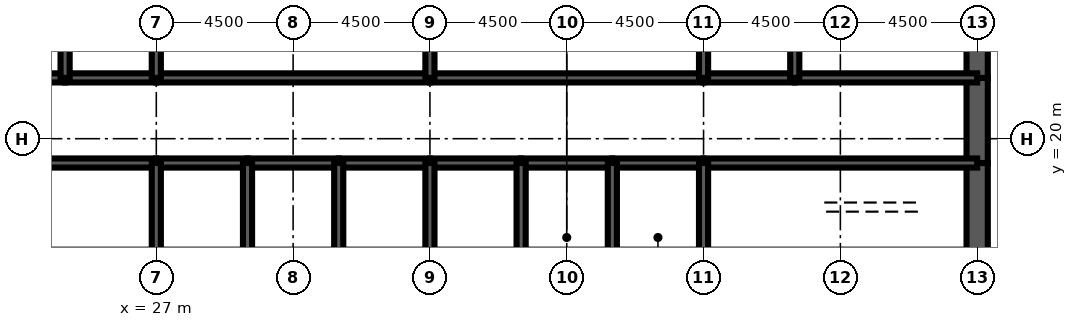
"""IFC4 building model, lengths in metres.
Left out: names, types, materials, properties, quantities, classifications, styles, units other than length and angle.
Written with IfcOpenShell. Run it as: python <this file> out.ifc"""

import sys

from ifc_helpers import new_model, si_unit, direction, frame, frame_2d, origin, place, context, subcontext, project, spatial, rectangle, extrude, element, fill, save


model = new_model("IFC4")
c1 = context("Model", 3, precision=1e-05, world=origin(), true_north=direction((0.0, 1.0)))
c2 = subcontext(c1, "Body", "Model", "MODEL_VIEW")
j1 = project(units=[si_unit("LENGTHUNIT", "METRE"), si_unit("PLANEANGLEUNIT", "RADIAN")], contexts=[c1])
p1 = place(None, origin())
s1 = spatial("IfcSite", under=j1, at=p1, CompositionType="ELEMENT")
p2 = place(p1, origin())
s2 = spatial("IfcBuilding", under=s1, at=p2, CompositionType="ELEMENT")
p3 = place(p2, frame((0.0, 0.0, 287.9)))
s3 = spatial("IfcBuildingStorey", under=s2, at=p3, CompositionType="ELEMENT", Elevation=287.9)
p4 = place(p3, frame((54.0, 16.0, 0.0), z_axis=(0.0, 0.0, 1.0), x_axis=(0.0, 1.0, 0.0)))
e1 = element("IfcWall", 1, at=p4, inside=s3, PredefinedType="SHEAR", context=c2, shape_type="SweptSolid", body=[
    extrude(rectangle(XDim=3.2, YDim=0.7, at=frame_2d((1.6, 0.0))), origin(), (0.0, 0.0, 1.0), 4.2),
])
p5 = place(p3, frame((54.0, 19.2, 0.0), z_axis=(0.0, 0.0, 1.0), x_axis=(0.0, 1.0, 0.0)))
e2 = element("IfcWall", 2, at=p5, inside=s3, PredefinedType="SHEAR", context=c2, shape_type="SweptSolid", body=[
    extrude(rectangle(XDim=2.8, YDim=0.7, at=frame_2d((1.4, 0.0))), origin(), (0.0, 0.0, 1.0), 4.2),
])
p6 = place(p5, frame((0.4, 0.0, 0.0)))
e3 = element("IfcOpeningElement", 3, at=p6, cuts=e2, PredefinedType="OPENING", context=c2, shape_type="SweptSolid", body=[
    extrude(rectangle(XDim=1.8, YDim=2.1, at=frame_2d((0.9, 1.05))), frame((0.0, 0.36, 0.0), z_axis=(0.0, -1.0, 0.0), x_axis=(1.0, 0.0, 0.0)), (0.0, 0.0, 1.0), 0.72),
])
p7 = place(p3, frame((54.0, 22.0, 0.0), z_axis=(0.0, 0.0, 1.0), x_axis=(0.0, 1.0, 0.0)))
e4 = element("IfcWall", 4, at=p7, inside=s3, PredefinedType="SHEAR", context=c2, shape_type="SweptSolid", body=[
    extrude(rectangle(XDim=4.0, YDim=0.7, at=frame_2d((2.0, 0.0))), origin(), (0.0, 0.0, 1.0), 4.2),
])
p8 = place(p3, frame((18.0, 19.2, 0.0), z_axis=(0.0, 0.0, 1.0), x_axis=(1.0, 0.0, 0.0)))
e5 = element("IfcWall", 5, at=p8, inside=s3, PredefinedType="SOLIDWALL", context=c2, shape_type="SweptSolid", body=[
    extrude(rectangle(XDim=9.0, YDim=0.3, at=frame_2d((4.5, 0.0))), origin(), (0.0, 0.0, 1.0), 4.2),
])
p9 = place(p8, frame((0.65, 0.0, 0.0)))
e6 = element("IfcOpeningElement", 6, at=p9, cuts=e5, PredefinedType="OPENING", context=c2, shape_type="SweptSolid", body=[
    extrude(rectangle(XDim=1.0, YDim=2.1, at=frame_2d((0.5, 1.05))), frame((0.0, 0.16, 0.0), z_axis=(0.0, -1.0, 0.0), x_axis=(1.0, 0.0, 0.0)), (0.0, 0.0, 1.0), 0.32),
])
p10 = place(p3, frame((27.0, 19.2, 0.0), z_axis=(0.0, 0.0, 1.0), x_axis=(1.0, 0.0, 0.0)))
e7 = element("IfcWall", 7, at=p10, inside=s3, PredefinedType="SOLIDWALL", context=c2, shape_type="SweptSolid", body=[
    extrude(rectangle(XDim=3.0, YDim=0.3, at=frame_2d((1.5, 0.0))), origin(), (0.0, 0.0, 1.0), 4.2),
])
p11 = place(p10, frame((0.95, 0.0, 0.0)))
e8 = element("IfcOpeningElement", 8, at=p11, cuts=e7, PredefinedType="OPENING", context=c2, shape_type="SweptSolid", body=[
    extrude(rectangle(XDim=1.1, YDim=2.2, at=frame_2d((0.55, 1.1))), frame((0.0, 0.16, 0.0), z_axis=(0.0, -1.0, 0.0), x_axis=(1.0, 0.0, 0.0)), (0.0, 0.0, 1.0), 0.32),
])
p12 = place(p3, frame((30.0, 19.2, 0.0), z_axis=(0.0, 0.0, 1.0), x_axis=(1.0, 0.0, 0.0)))
e9 = element("IfcWall", 9, at=p12, inside=s3, PredefinedType="SOLIDWALL", context=c2, shape_type="SweptSolid", body=[
    extrude(rectangle(XDim=3.0, YDim=0.3, at=frame_2d((1.5, 0.0))), origin(), (0.0, 0.0, 1.0), 4.2),
])
p13 = place(p12, frame((0.95, 0.0, 0.0)))
e10 = element("IfcOpeningElement", 10, at=p13, cuts=e9, PredefinedType="OPENING", context=c2, shape_type="SweptSolid", body=[
    extrude(rectangle(XDim=1.1, YDim=2.2, at=frame_2d((0.55, 1.1))), frame((0.0, 0.16, 0.0), z_axis=(0.0, -1.0, 0.0), x_axis=(1.0, 0.0, 0.0)), (0.0, 0.0, 1.0), 0.32),
])
p14 = place(p3, frame((33.0, 19.2, 0.0), z_axis=(0.0, 0.0, 1.0), x_axis=(1.0, 0.0, 0.0)))
e11 = element("IfcWall", 11, at=p14, inside=s3, PredefinedType="SOLIDWALL", context=c2, shape_type="SweptSolid", body=[
    extrude(rectangle(XDim=3.0, YDim=0.3, at=frame_2d((1.5, 0.0))), origin(), (0.0, 0.0, 1.0), 4.2),
])
p15 = place(p14, frame((0.95, 0.0, 0.0)))
e12 = element("IfcOpeningElement", 12, at=p15, cuts=e11, PredefinedType="OPENING", context=c2, shape_type="SweptSolid", body=[
    extrude(rectangle(XDim=1.1, YDim=2.2, at=frame_2d((0.55, 1.1))), frame((0.0, 0.16, 0.0), z_axis=(0.0, -1.0, 0.0), x_axis=(1.0, 0.0, 0.0)), (0.0, 0.0, 1.0), 0.32),
])
p16 = place(p3, frame((36.0, 19.2, 0.0), z_axis=(0.0, 0.0, 1.0), x_axis=(1.0, 0.0, 0.0)))
e13 = element("IfcWall", 13, at=p16, inside=s3, PredefinedType="SOLIDWALL", context=c2, shape_type="SweptSolid", body=[
    extrude(rectangle(XDim=3.0, YDim=0.3, at=frame_2d((1.5, 0.0))), origin(), (0.0, 0.0, 1.0), 4.2),
])
p17 = place(p16, frame((0.95, 0.0, 0.0)))
e14 = element("IfcOpeningElement", 14, at=p17, cuts=e13, PredefinedType="OPENING", context=c2, shape_type="SweptSolid", body=[
    extrude(rectangle(XDim=1.1, YDim=2.2, at=frame_2d((0.55, 1.1))), frame((0.0, 0.16, 0.0), z_axis=(0.0, -1.0, 0.0), x_axis=(1.0, 0.0, 0.0)), (0.0, 0.0, 1.0), 0.32),
])
p18 = place(p3, frame((39.0, 19.2, 0.0), z_axis=(0.0, 0.0, 1.0), x_axis=(1.0, 0.0, 0.0)))
e15 = element("IfcWall", 15, at=p18, inside=s3, PredefinedType="SOLIDWALL", context=c2, shape_type="SweptSolid", body=[
    extrude(rectangle(XDim=3.0, YDim=0.3, at=frame_2d((1.5, 0.0))), origin(), (0.0, 0.0, 1.0), 4.2),
])
p19 = place(p18, frame((1.0, 0.0, 0.0)))
e16 = element("IfcOpeningElement", 16, at=p19, cuts=e15, PredefinedType="OPENING", context=c2, shape_type="SweptSolid", body=[
    extrude(rectangle(XDim=1.0, YDim=2.1, at=frame_2d((0.5, 1.05))), frame((0.0, 0.16, 0.0), z_axis=(0.0, -1.0, 0.0), x_axis=(1.0, 0.0, 0.0)), (0.0, 0.0, 1.0), 0.32),
])
p20 = place(p3, frame((42.0, 19.2, 0.0), z_axis=(0.0, 0.0, 1.0), x_axis=(1.0, 0.0, 0.0)))
e17 = element("IfcWall", 17, at=p20, inside=s3, PredefinedType="SOLIDWALL", context=c2, shape_type="SweptSolid", body=[
    extrude(rectangle(XDim=3.0, YDim=0.3, at=frame_2d((1.5, 0.0))), origin(), (0.0, 0.0, 1.0), 4.2),
])
p21 = place(p20, frame((1.0, 0.0, 0.0)))
e18 = element("IfcOpeningElement", 18, at=p21, cuts=e17, PredefinedType="OPENING", context=c2, shape_type="SweptSolid", body=[
    extrude(rectangle(XDim=1.0, YDim=2.1, at=frame_2d((0.5, 1.05))), frame((0.0, 0.16, 0.0), z_axis=(0.0, -1.0, 0.0), x_axis=(1.0, 0.0, 0.0)), (0.0, 0.0, 1.0), 0.32),
])
p22 = place(p3, frame((45.0, 19.2, 0.0), z_axis=(0.0, 0.0, 1.0), x_axis=(1.0, 0.0, 0.0)))
e19 = element("IfcWall", 19, at=p22, inside=s3, PredefinedType="SOLIDWALL", context=c2, shape_type="SweptSolid", body=[
    extrude(rectangle(XDim=9.0, YDim=0.3, at=frame_2d((4.5, 0.0))), origin(), (0.0, 0.0, 1.0), 4.2),
])
p23 = place(p22, frame((7.35, 0.0, 0.0)))
e20 = element("IfcOpeningElement", 20, at=p23, cuts=e19, PredefinedType="OPENING", context=c2, shape_type="SweptSolid", body=[
    extrude(rectangle(XDim=1.0, YDim=2.1, at=frame_2d((0.5, 1.05))), frame((0.0, 0.16, 0.0), z_axis=(0.0, -1.0, 0.0), x_axis=(1.0, 0.0, 0.0)), (0.0, 0.0, 1.0), 0.32),
])
p24 = place(p3, frame((18.0, 22.0, 0.0), z_axis=(0.0, 0.0, 1.0), x_axis=(1.0, 0.0, 0.0)))
e21 = element("IfcWall", 21, at=p24, inside=s3, PredefinedType="SOLIDWALL", context=c2, shape_type="SweptSolid", body=[
    extrude(rectangle(XDim=6.0, YDim=0.3, at=frame_2d((3.0, 0.0))), origin(), (0.0, 0.0, 1.0), 4.2),
])
p25 = place(p24, frame((4.4, 0.0, 0.0)))
e22 = element("IfcOpeningElement", 22, at=p25, cuts=e21, PredefinedType="OPENING", context=c2, shape_type="SweptSolid", body=[
    extrude(rectangle(XDim=1.0, YDim=2.1, at=frame_2d((0.5, 1.05))), frame((0.0, 0.16, 0.0), z_axis=(0.0, -1.0, 0.0), x_axis=(1.0, 0.0, 0.0)), (0.0, 0.0, 1.0), 0.32),
])
p26 = place(p24, frame((0.75, 0.0, 0.0)))
e23 = element("IfcOpeningElement", 23, at=p26, cuts=e21, PredefinedType="OPENING", context=c2, shape_type="SweptSolid", body=[
    extrude(rectangle(XDim=1.0, YDim=2.1, at=frame_2d((0.5, 1.05))), frame((0.0, 0.16, 0.0), z_axis=(0.0, -1.0, 0.0), x_axis=(1.0, 0.0, 0.0)), (0.0, 0.0, 1.0), 0.32),
])
p27 = place(p3, frame((24.0, 22.0, 0.0), z_axis=(0.0, 0.0, 1.0), x_axis=(1.0, 0.0, 0.0)))
e24 = element("IfcWall", 24, at=p27, inside=s3, PredefinedType="SOLIDWALL", context=c2, shape_type="SweptSolid", body=[
    extrude(rectangle(XDim=3.0, YDim=0.3, at=frame_2d((1.5, 0.0))), origin(), (0.0, 0.0, 1.0), 4.2),
])
p28 = place(p27, frame((1.0, 0.0, 0.0)))
e25 = element("IfcOpeningElement", 25, at=p28, cuts=e24, PredefinedType="OPENING", context=c2, shape_type="SweptSolid", body=[
    extrude(rectangle(XDim=1.0, YDim=2.1, at=frame_2d((0.5, 1.05))), frame((0.0, 0.16, 0.0), z_axis=(0.0, -1.0, 0.0), x_axis=(1.0, 0.0, 0.0)), (0.0, 0.0, 1.0), 0.32),
])
p29 = place(p3, frame((27.0, 22.0, 0.0), z_axis=(0.0, 0.0, 1.0), x_axis=(1.0, 0.0, 0.0)))
e26 = element("IfcWall", 26, at=p29, inside=s3, PredefinedType="SOLIDWALL", context=c2, shape_type="SweptSolid", body=[
    extrude(rectangle(XDim=9.0, YDim=0.3, at=frame_2d((4.5, 0.0))), origin(), (0.0, 0.0, 1.0), 4.2),
])
p30 = place(p29, frame((4.0, 0.0, 0.0)))
e27 = element("IfcOpeningElement", 27, at=p30, cuts=e26, PredefinedType="OPENING", context=c2, shape_type="SweptSolid", body=[
    extrude(rectangle(XDim=1.0, YDim=2.1, at=frame_2d((0.5, 1.05))), frame((0.0, 0.16, 0.0), z_axis=(0.0, -1.0, 0.0), x_axis=(1.0, 0.0, 0.0)), (0.0, 0.0, 1.0), 0.32),
])
p31 = place(p3, frame((36.0, 22.0, 0.0), z_axis=(0.0, 0.0, 1.0), x_axis=(1.0, 0.0, 0.0)))
e28 = element("IfcWall", 28, at=p31, inside=s3, PredefinedType="SOLIDWALL", context=c2, shape_type="SweptSolid", body=[
    extrude(rectangle(XDim=9.0, YDim=0.3, at=frame_2d((4.5, 0.0))), origin(), (0.0, 0.0, 1.0), 4.2),
])
p32 = place(p31, frame((4.0, 0.0, 0.0)))
e29 = element("IfcOpeningElement", 29, at=p32, cuts=e28, PredefinedType="OPENING", context=c2, shape_type="SweptSolid", body=[
    extrude(rectangle(XDim=1.0, YDim=2.1, at=frame_2d((0.5, 1.05))), frame((0.0, 0.16, 0.0), z_axis=(0.0, -1.0, 0.0), x_axis=(1.0, 0.0, 0.0)), (0.0, 0.0, 1.0), 0.32),
])
p33 = place(p3, frame((45.0, 22.0, 0.0), z_axis=(0.0, 0.0, 1.0), x_axis=(1.0, 0.0, 0.0)))
e30 = element("IfcWall", 30, at=p33, inside=s3, PredefinedType="SOLIDWALL", context=c2, shape_type="SweptSolid", body=[
    extrude(rectangle(XDim=3.0, YDim=0.3, at=frame_2d((1.5, 0.0))), origin(), (0.0, 0.0, 1.0), 4.2),
])
p34 = place(p33, frame((1.0, 0.0, 0.0)))
e31 = element("IfcOpeningElement", 31, at=p34, cuts=e30, PredefinedType="OPENING", context=c2, shape_type="SweptSolid", body=[
    extrude(rectangle(XDim=1.0, YDim=2.1, at=frame_2d((0.5, 1.05))), frame((0.0, 0.16, 0.0), z_axis=(0.0, -1.0, 0.0), x_axis=(1.0, 0.0, 0.0)), (0.0, 0.0, 1.0), 0.32),
])
p35 = place(p3, frame((48.0, 22.0, 0.0), z_axis=(0.0, 0.0, 1.0), x_axis=(1.0, 0.0, 0.0)))
e32 = element("IfcWall", 32, at=p35, inside=s3, PredefinedType="SOLIDWALL", context=c2, shape_type="SweptSolid", body=[
    extrude(rectangle(XDim=6.0, YDim=0.3, at=frame_2d((3.0, 0.0))), origin(), (0.0, 0.0, 1.0), 4.2),
])
p36 = place(p35, frame((2.0, 0.0, 0.0)))
e33 = element("IfcOpeningElement", 33, at=p36, cuts=e32, PredefinedType="OPENING", context=c2, shape_type="SweptSolid", body=[
    extrude(rectangle(XDim=1.0, YDim=2.1, at=frame_2d((0.5, 1.05))), frame((0.0, 0.16, 0.0), z_axis=(0.0, -1.0, 0.0), x_axis=(1.0, 0.0, 0.0)), (0.0, 0.0, 1.0), 0.32),
])
for number, where, z_axis, x_axis in (
    (34, (27.0, 16.0, 0.0), (0.0, 0.0, 1.0), (0.0, 1.0, 0.0)),
    (35, (30.0, 16.0, 0.0), (0.0, 0.0, 1.0), (0.0, 1.0, 0.0)),
    (36, (33.0, 16.0, 0.0), (0.0, 0.0, 1.0), (0.0, 1.0, 0.0)),
    (37, (36.0, 16.0, 0.0), (0.0, 0.0, 1.0), (0.0, 1.0, 0.0)),
    (38, (39.0, 16.0, 0.0), (0.0, 0.0, 1.0), (0.0, 1.0, 0.0)),
    (39, (42.0, 16.0, 0.0), (0.0, 0.0, 1.0), (0.0, 1.0, 0.0)),
    (40, (45.0, 16.0, 0.0), (0.0, 0.0, 1.0), (0.0, 1.0, 0.0)),
):
    element("IfcWall", number, at=place(p3, frame(where, z_axis=z_axis, x_axis=x_axis)), inside=s3, PredefinedType="SOLIDWALL", context=c2, shape_type="SweptSolid", body=[
        extrude(rectangle(XDim=3.2, YDim=0.3, at=frame_2d((1.6, 0.0))), origin(), (0.0, 0.0, 1.0), 4.2),
    ])
for number, where, z_axis, x_axis in (
    (41, (24.0, 22.0, 0.0), (0.0, 0.0, 1.0), (0.0, 1.0, 0.0)),
    (42, (27.0, 22.0, 0.0), (0.0, 0.0, 1.0), (0.0, 1.0, 0.0)),
    (43, (36.0, 22.0, 0.0), (0.0, 0.0, 1.0), (0.0, 1.0, 0.0)),
    (44, (45.0, 22.0, 0.0), (0.0, 0.0, 1.0), (0.0, 1.0, 0.0)),
    (45, (48.0, 22.0, 0.0), (0.0, 0.0, 1.0), (0.0, 1.0, 0.0)),
):
    element("IfcWall", number, at=place(p3, frame(where, z_axis=z_axis, x_axis=x_axis)), inside=s3, PredefinedType="SOLIDWALL", context=c2, shape_type="SweptSolid", body=[
        extrude(rectangle(XDim=4.0, YDim=0.3, at=frame_2d((2.0, 0.0))), origin(), (0.0, 0.0, 1.0), 4.2),
    ])
p37 = place(p3, frame((39.15, 17.3, 0.0), z_axis=(0.0, 0.0, 1.0), x_axis=(1.0, 0.0, 0.0)))
e46 = element("IfcWall", 46, at=p37, inside=s3, PredefinedType="SOLIDWALL", context=c2, shape_type="SweptSolid", body=[
    extrude(rectangle(XDim=2.7, YDim=0.3, at=frame_2d((1.35, 0.0))), origin(), (0.0, 0.0, 1.0), 4.04),
])
p38 = place(p37, frame((0.85, 0.0, 0.0)))
e47 = element("IfcOpeningElement", 47, at=p38, cuts=e46, PredefinedType="OPENING", context=c2, shape_type="SweptSolid", body=[
    extrude(rectangle(XDim=1.0, YDim=2.1, at=frame_2d((0.5, 1.05))), frame((0.0, 0.16, 0.0), z_axis=(0.0, -1.0, 0.0), x_axis=(1.0, 0.0, 0.0)), (0.0, 0.0, 1.0), 0.32),
])
p39 = place(p3, frame((42.15, 17.3, 0.0), z_axis=(0.0, 0.0, 1.0), x_axis=(1.0, 0.0, 0.0)))
e48 = element("IfcWall", 48, at=p39, inside=s3, PredefinedType="SOLIDWALL", context=c2, shape_type="SweptSolid", body=[
    extrude(rectangle(XDim=2.7, YDim=0.3, at=frame_2d((1.35, 0.0))), origin(), (0.0, 0.0, 1.0), 4.04),
])
p40 = place(p39, frame((0.85, 0.0, 0.0)))
e49 = element("IfcOpeningElement", 49, at=p40, cuts=e48, PredefinedType="OPENING", context=c2, shape_type="SweptSolid", body=[
    extrude(rectangle(XDim=1.0, YDim=2.1, at=frame_2d((0.5, 1.05))), frame((0.0, 0.16, 0.0), z_axis=(0.0, -1.0, 0.0), x_axis=(1.0, 0.0, 0.0)), (0.0, 0.0, 1.0), 0.32),
])
p41 = place(p3, frame((24.5, 19.35, 0.0), z_axis=(0.0, 0.0, 1.0), x_axis=(0.0, 1.0, 0.0)))
e50 = element("IfcWall", 50, at=p41, inside=s3, PredefinedType="PARTITIONING", context=c2, shape_type="SweptSolid", body=[
    extrude(rectangle(XDim=2.5, YDim=0.15, at=frame_2d((1.25, 0.0))), origin(), (0.0, 0.0, 1.0), 3.0),
])
p42 = place(p41, frame((1.15, 0.0, 0.0)))
e51 = element("IfcOpeningElement", 51, at=p42, cuts=e50, PredefinedType="OPENING", context=c2, shape_type="SweptSolid", body=[
    extrude(rectangle(XDim=1.0, YDim=2.1, at=frame_2d((0.5, 1.05))), frame((0.0, 0.085, 0.0), z_axis=(0.0, -1.0, 0.0), x_axis=(1.0, 0.0, 0.0)), (0.0, 0.0, 1.0), 0.17),
])
p43 = place(p38, origin())
e52 = element("IfcDoor", 52, at=p43, inside=s3, OperationType="SINGLE_SWING_LEFT", PredefinedType="DOOR", context=c2, shape_type="SweptSolid", body=[
    extrude(rectangle(XDim=1.0, YDim=2.1, at=frame_2d((0.5, 1.05))), frame((0.0, 0.025, 0.0), z_axis=(0.0, -1.0, 0.0), x_axis=(1.0, 0.0, 0.0)), (0.0, 0.0, 1.0), 0.05),
])
fill(e47, e52)
p44 = place(p40, origin())
e53 = element("IfcDoor", 53, at=p44, inside=s3, OperationType="SINGLE_SWING_LEFT", PredefinedType="DOOR", context=c2, shape_type="SweptSolid", body=[
    extrude(rectangle(XDim=1.0, YDim=2.1, at=frame_2d((0.5, 1.05))), frame((0.0, 0.025, 0.0), z_axis=(0.0, -1.0, 0.0), x_axis=(1.0, 0.0, 0.0)), (0.0, 0.0, 1.0), 0.05),
])
fill(e49, e53)
p45 = place(p42, origin())
e54 = element("IfcDoor", 54, at=p45, inside=s3, OperationType="SINGLE_SWING_RIGHT", PredefinedType="DOOR", context=c2, shape_type="SweptSolid", body=[
    extrude(rectangle(XDim=1.0, YDim=2.1, at=frame_2d((0.5, 1.05))), frame((0.0, 0.025, 0.0), z_axis=(0.0, -1.0, 0.0), x_axis=(1.0, 0.0, 0.0)), (0.0, 0.0, 1.0), 0.05),
])
fill(e51, e54)
p46 = place(p11, origin())
e55 = element("IfcDoor", 55, at=p46, inside=s3, OperationType="DOUBLE_DOOR_SLIDING", PredefinedType="USERDEFINED", context=c2, shape_type="SweptSolid", body=[
    extrude(rectangle(XDim=1.1, YDim=2.2, at=frame_2d((0.55, 1.1))), frame((0.0, 0.025, 0.0), z_axis=(0.0, -1.0, 0.0), x_axis=(1.0, 0.0, 0.0)), (0.0, 0.0, 1.0), 0.05),
])
fill(e8, e55)
p47 = place(p13, origin())
e56 = element("IfcDoor", 56, at=p47, inside=s3, OperationType="DOUBLE_DOOR_SLIDING", PredefinedType="USERDEFINED", context=c2, shape_type="SweptSolid", body=[
    extrude(rectangle(XDim=1.1, YDim=2.2, at=frame_2d((0.55, 1.1))), frame((0.0, 0.025, 0.0), z_axis=(0.0, -1.0, 0.0), x_axis=(1.0, 0.0, 0.0)), (0.0, 0.0, 1.0), 0.05),
])
fill(e10, e56)
p48 = place(p15, origin())
e57 = element("IfcDoor", 57, at=p48, inside=s3, OperationType="DOUBLE_DOOR_SLIDING", PredefinedType="USERDEFINED", context=c2, shape_type="SweptSolid", body=[
    extrude(rectangle(XDim=1.1, YDim=2.2, at=frame_2d((0.55, 1.1))), frame((0.0, 0.025, 0.0), z_axis=(0.0, -1.0, 0.0), x_axis=(1.0, 0.0, 0.0)), (0.0, 0.0, 1.0), 0.05),
])
fill(e12, e57)
p49 = place(p17, origin())
e58 = element("IfcDoor", 58, at=p49, inside=s3, OperationType="DOUBLE_DOOR_SLIDING", PredefinedType="USERDEFINED", context=c2, shape_type="SweptSolid", body=[
    extrude(rectangle(XDim=1.1, YDim=2.2, at=frame_2d((0.55, 1.1))), frame((0.0, 0.025, 0.0), z_axis=(0.0, -1.0, 0.0), x_axis=(1.0, 0.0, 0.0)), (0.0, 0.0, 1.0), 0.05),
])
fill(e14, e58)
p50 = place(p23, origin())
e59 = element("IfcDoor", 59, at=p50, inside=s3, OperationType="SINGLE_SWING_RIGHT", PredefinedType="DOOR", context=c2, shape_type="SweptSolid", body=[
    extrude(rectangle(XDim=1.0, YDim=2.1, at=frame_2d((0.5, 1.05))), frame((0.0, 0.025, 0.0), z_axis=(0.0, -1.0, 0.0), x_axis=(1.0, 0.0, 0.0)), (0.0, 0.0, 1.0), 0.05),
])
fill(e20, e59)
p51 = place(p6, origin())
e60 = element("IfcDoor", 60, at=p51, inside=s3, OperationType="SINGLE_SWING_LEFT", PredefinedType="DOOR", context=c2, shape_type="SweptSolid", body=[
    extrude(rectangle(XDim=1.8, YDim=2.1, at=frame_2d((0.9, 1.05))), frame((0.0, 0.35, 0.0), z_axis=(0.0, -1.0, 0.0), x_axis=(1.0, 0.0, 0.0)), (0.0, 0.0, 1.0), 0.699),
])
fill(e3, e60)
p52 = place(p28, origin())
e61 = element("IfcDoor", 61, at=p52, inside=s3, OperationType="SINGLE_SWING_LEFT", PredefinedType="DOOR", context=c2, shape_type="SweptSolid", body=[
    extrude(rectangle(XDim=1.0, YDim=2.1, at=frame_2d((0.5, 1.05))), frame((0.0, 0.025, 0.0), z_axis=(0.0, -1.0, 0.0), x_axis=(1.0, 0.0, 0.0)), (0.0, 0.0, 1.0), 0.05),
])
fill(e25, e61)
p53 = place(p30, origin())
e62 = element("IfcDoor", 62, at=p53, inside=s3, OperationType="SINGLE_SWING_LEFT", PredefinedType="DOOR", context=c2, shape_type="SweptSolid", body=[
    extrude(rectangle(XDim=1.0, YDim=2.1, at=frame_2d((0.5, 1.05))), frame((0.0, 0.025, 0.0), z_axis=(0.0, -1.0, 0.0), x_axis=(1.0, 0.0, 0.0)), (0.0, 0.0, 1.0), 0.05),
])
fill(e27, e62)
p54 = place(p32, origin())
e63 = element("IfcDoor", 63, at=p54, inside=s3, OperationType="SINGLE_SWING_LEFT", PredefinedType="DOOR", context=c2, shape_type="SweptSolid", body=[
    extrude(rectangle(XDim=1.0, YDim=2.1, at=frame_2d((0.5, 1.05))), frame((0.0, 0.025, 0.0), z_axis=(0.0, -1.0, 0.0), x_axis=(1.0, 0.0, 0.0)), (0.0, 0.0, 1.0), 0.05),
])
fill(e29, e63)
p55 = place(p34, origin())
e64 = element("IfcDoor", 64, at=p55, inside=s3, OperationType="SINGLE_SWING_LEFT", PredefinedType="DOOR", context=c2, shape_type="SweptSolid", body=[
    extrude(rectangle(XDim=1.0, YDim=2.1, at=frame_2d((0.5, 1.05))), frame((0.0, 0.025, 0.0), z_axis=(0.0, -1.0, 0.0), x_axis=(1.0, 0.0, 0.0)), (0.0, 0.0, 1.0), 0.05),
])
fill(e31, e64)
p56 = place(p36, origin())
e65 = element("IfcDoor", 65, at=p56, inside=s3, OperationType="SINGLE_SWING_LEFT", PredefinedType="DOOR", context=c2, shape_type="SweptSolid", body=[
    extrude(rectangle(XDim=1.0, YDim=2.1, at=frame_2d((0.5, 1.05))), frame((0.0, 0.025, 0.0), z_axis=(0.0, -1.0, 0.0), x_axis=(1.0, 0.0, 0.0)), (0.0, 0.0, 1.0), 0.05),
])
fill(e33, e65)
p57 = place(p19, origin())
e66 = element("IfcDoor", 66, at=p57, inside=s3, OperationType="SINGLE_SWING_LEFT", PredefinedType="DOOR", context=c2, shape_type="SweptSolid", body=[
    extrude(rectangle(XDim=1.0, YDim=2.1, at=frame_2d((0.5, 1.05))), frame((0.0, 0.025, 0.0), z_axis=(0.0, -1.0, 0.0), x_axis=(1.0, 0.0, 0.0)), (0.0, 0.0, 1.0), 0.05),
])
fill(e16, e66)
p58 = place(p21, origin())
e67 = element("IfcDoor", 67, at=p58, inside=s3, OperationType="SINGLE_SWING_LEFT", PredefinedType="DOOR", context=c2, shape_type="SweptSolid", body=[
    extrude(rectangle(XDim=1.0, YDim=2.1, at=frame_2d((0.5, 1.05))), frame((0.0, 0.025, 0.0), z_axis=(0.0, -1.0, 0.0), x_axis=(1.0, 0.0, 0.0)), (0.0, 0.0, 1.0), 0.05),
])
fill(e18, e67)
save(model, sys.argv[1])
